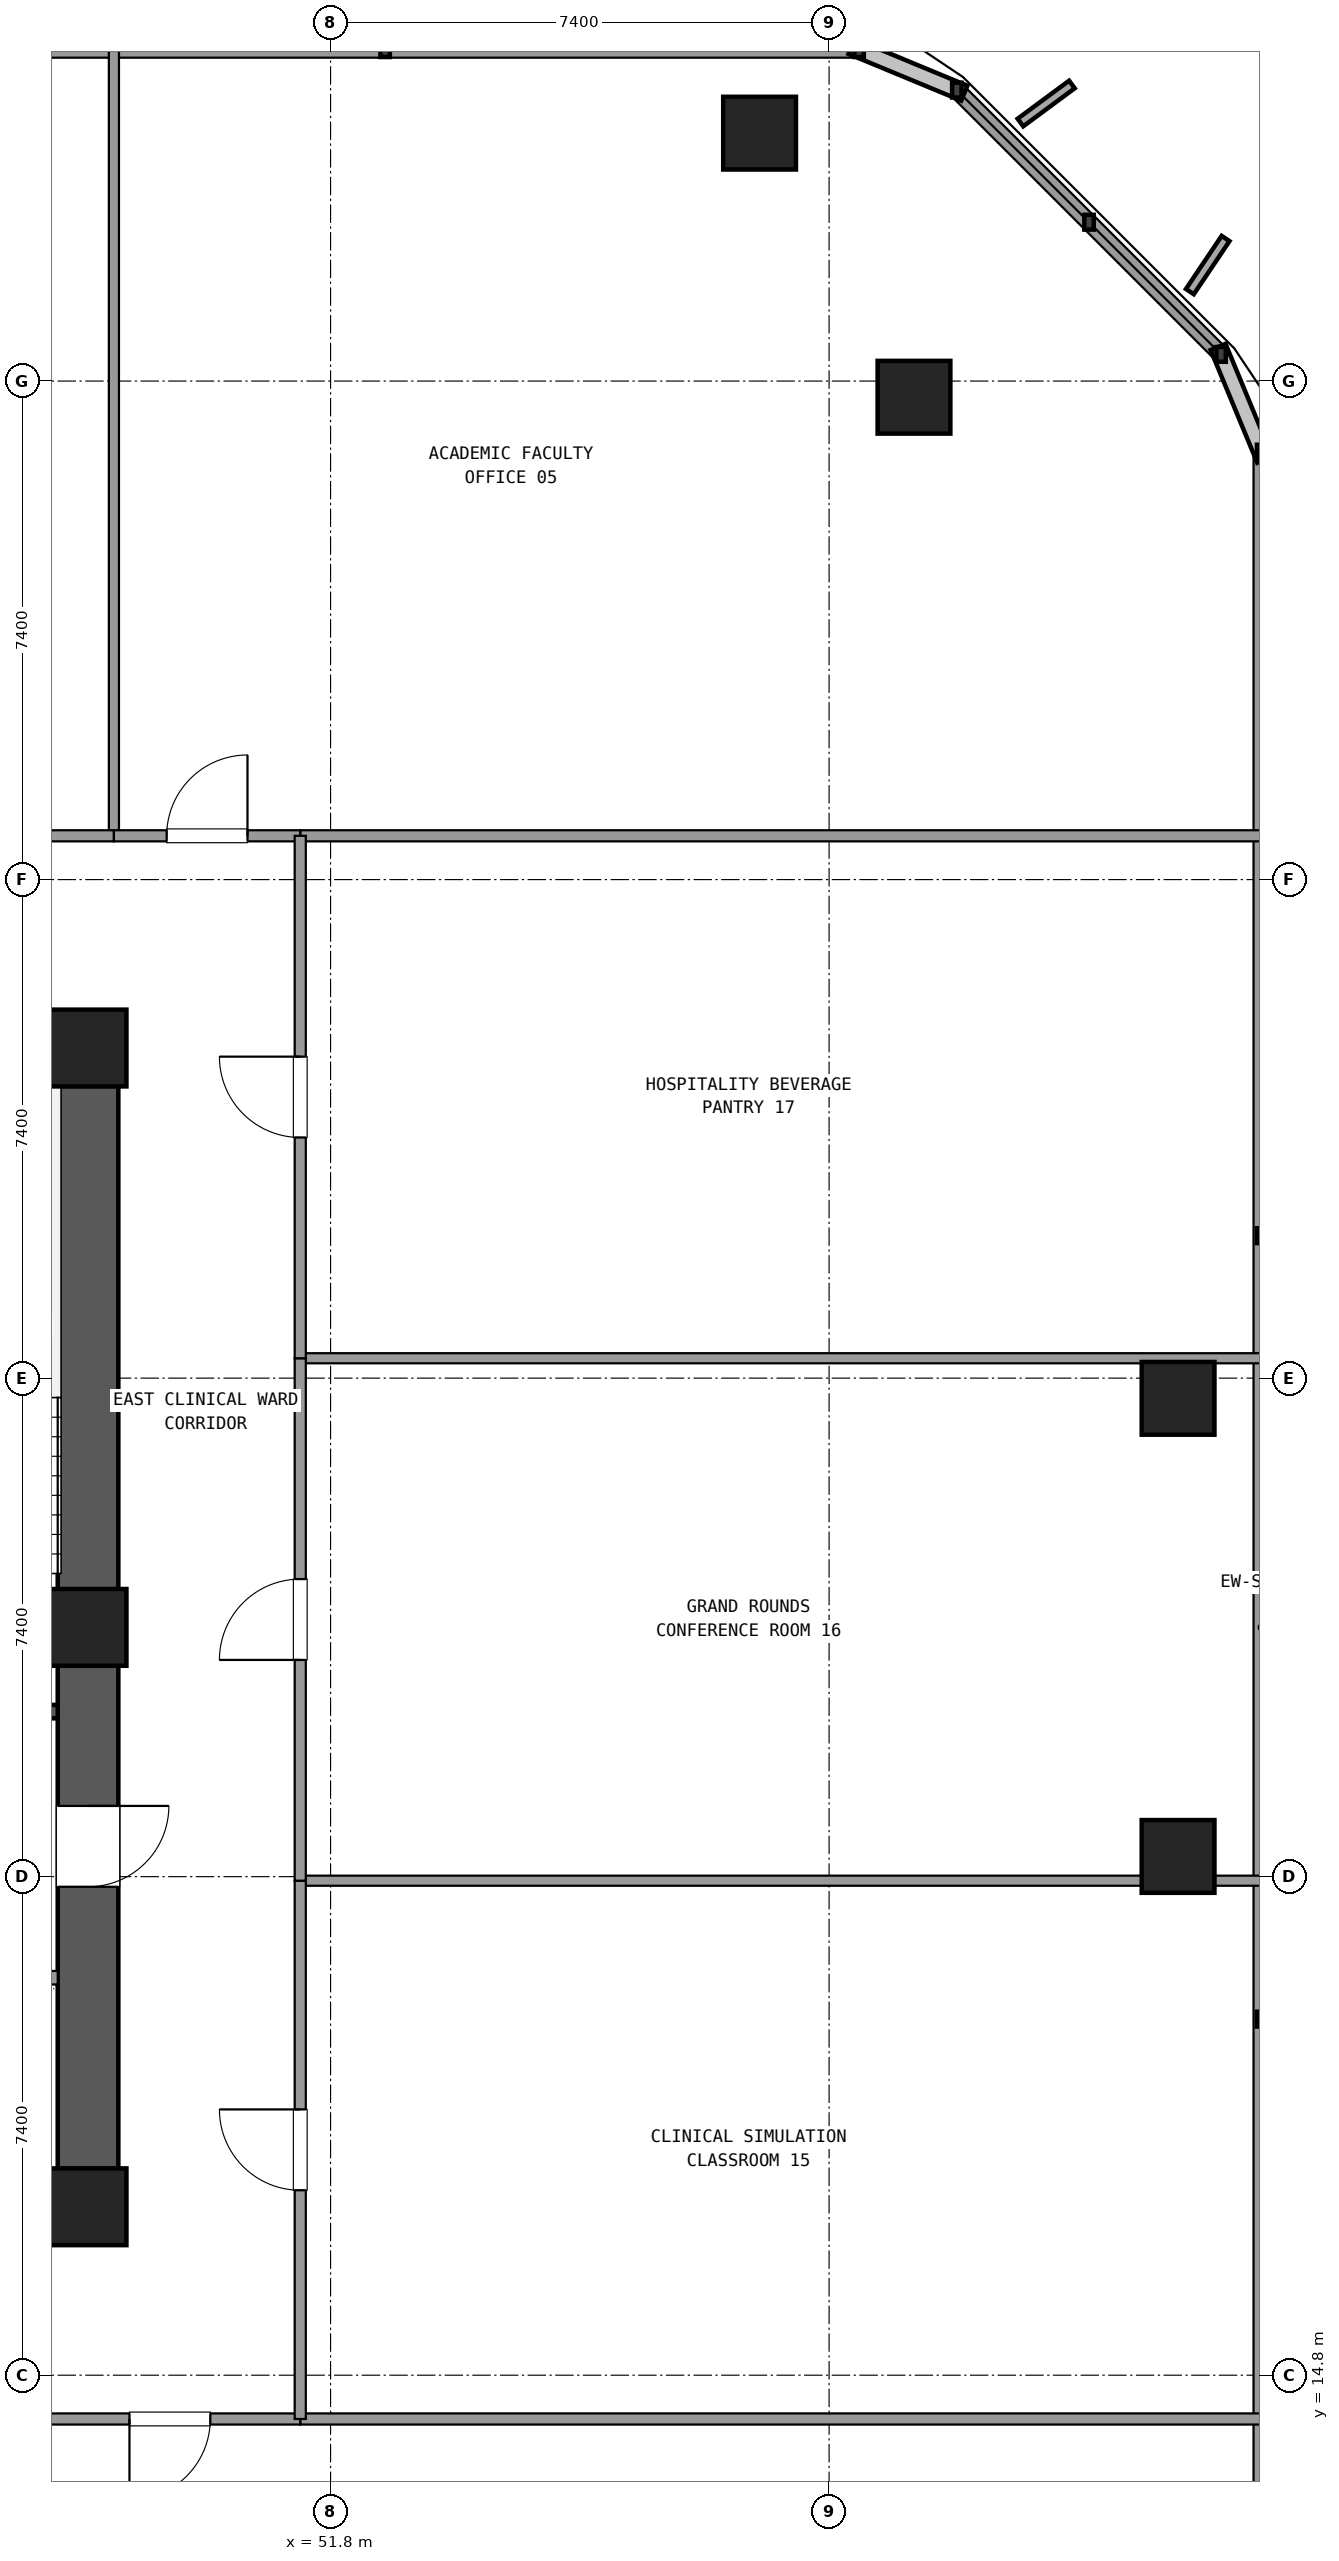
"""IFC4 building model, lengths in metres.
Left out: names, types, materials, properties, quantities, classifications, styles, units other than length and angle.
Written with IfcOpenShell. Run it as: python <this file> out.ifc"""

import sys

from ifc_helpers import new_model, si_unit, direction, frame, frame_2d, origin, origin_2d, place, context, subcontext, project, spatial, rectangle, extrude, element, fill, save


model = new_model("IFC4")
c1 = context("Model", 3, precision=1e-05, world=origin(), true_north=direction((0.0, 1.0)))
c2 = subcontext(c1, "Body", "Model", "MODEL_VIEW")
j1 = project(units=[si_unit("LENGTHUNIT", "METRE"), si_unit("PLANEANGLEUNIT", "RADIAN")], contexts=[c1])
p1 = place(None, origin())
s1 = spatial("IfcSite", under=j1, at=p1, CompositionType="ELEMENT")
p2 = place(p1, origin())
s2 = spatial("IfcBuilding", under=s1, at=p2, CompositionType="ELEMENT")
p3 = place(p2, frame((0.0, 0.0, 52.74)))
s3 = spatial("IfcBuildingStorey", under=s2, at=p3, CompositionType="ELEMENT", Elevation=52.74)
for number, where, z_axis, x_axis in (
    (1, (48.2, 17.3, 0.0), (0.0, 0.0, 1.0), (1.0, 0.0, 0.0)),
    (2, (48.2, 25.9, 0.0), (0.0, 0.0, 1.0), (1.0, 0.0, 0.0)),
    (3, (48.2, 34.5, 0.0), (0.0, 0.0, 1.0), (1.0, 0.0, 0.0)),
):
    element("IfcColumn", number, at=place(p3, frame(where, z_axis=z_axis, x_axis=x_axis)), inside=s3, PredefinedType="COLUMN", context=c2, shape_type="SweptSolid", body=[
        extrude(rectangle(XDim=1.14, YDim=1.14, at=origin_2d()), origin(), (0.0, 0.0, 1.0), 3.6),
    ])
p4 = place(p3, frame((48.2, 17.865, 0.0), z_axis=(0.0, 0.0, 1.0), x_axis=(0.0, 1.0, 0.0)))
e4 = element("IfcWall", 4, at=p4, inside=s3, PredefinedType="SHEAR", context=c2, shape_type="SweptSolid", body=[
    extrude(rectangle(XDim=7.47, YDim=0.9, at=frame_2d((3.735, 0.0))), origin(), (0.0, 0.0, 1.0), 3.32),
])
p5 = place(p4, frame((4.185, 0.0, 0.0)))
e5 = element("IfcOpeningElement", 5, at=p5, cuts=e4, PredefinedType="OPENING", context=c2, shape_type="SweptSolid", body=[
    extrude(rectangle(XDim=1.2, YDim=2.15, at=frame_2d((0.6, 1.075))), frame((0.0, 0.46, 0.0), z_axis=(0.0, -1.0, 0.0), x_axis=(1.0, 0.0, 0.0)), (0.0, 0.0, 1.0), 0.92),
])
p6 = place(p3, frame((48.2, 26.465, 0.0), z_axis=(0.0, 0.0, 1.0), x_axis=(0.0, 1.0, 0.0)))
e6 = element("IfcWall", 6, at=p6, inside=s3, PredefinedType="SHEAR", context=c2, shape_type="SweptSolid", body=[
    extrude(rectangle(XDim=7.47, YDim=0.9, at=frame_2d((3.735, 0.0))), origin(), (0.0, 0.0, 1.0), 3.32),
])
for number, where, z_axis, x_axis in (
    (7, (64.38, 22.5, 0.0), (0.0, 0.0, 1.0), (1.0, 0.0, 0.0)),
    (8, (64.38, 29.3, 0.0), (0.0, 0.0, 1.0), (1.0, 0.0, 0.0)),
    (9, (60.46, 44.16, 0.0), (0.0, 0.0, 1.0), (1.0, 0.0, 0.0)),
    (10, (58.168, 48.08, 0.0), (0.0, 0.0, 1.0), (1.0, 0.0, 0.0)),
):
    element("IfcColumn", number, at=place(p3, frame(where, z_axis=z_axis, x_axis=x_axis)), inside=s3, PredefinedType="COLUMN", context=c2, shape_type="SweptSolid", body=[
        extrude(rectangle(XDim=1.08, YDim=1.08, at=origin_2d()), origin(), (0.0, 0.0, 1.0), 3.6),
    ])
p7 = place(p3, frame((65.62, 8.455, 0.0), z_axis=(0.0, 0.0, 1.0), x_axis=(0.0, 1.0, 0.0)))
e11 = element("IfcWall", 11, at=p7, inside=s3, PredefinedType="SOLIDWALL", context=c2, shape_type="SweptSolid", body=[
    extrude(rectangle(XDim=34.89, YDim=0.24, at=frame_2d((17.445, 0.0))), origin(), (0.0, 0.0, 1.0), 0.85),
])
p8 = place(p3, frame((65.019, 44.796, 0.0), z_axis=(0.0, 0.0, 1.0), x_axis=(-0.707106781187, 0.707106781187, 0.0)))
e12 = element("IfcWall", 12, at=p8, inside=s3, PredefinedType="SOLIDWALL", context=c2, shape_type="SweptSolid", body=[
    extrude(rectangle(XDim=5.548, YDim=0.24, at=frame_2d((2.774, 0.0))), origin(), (0.0, 0.0, 1.0), 0.85),
])
p9 = place(p3, frame((59.645, 49.32, 0.0), z_axis=(0.0, 0.0, 1.0), x_axis=(-1.0, 0.0, 0.0)))
e13 = element("IfcWall", 13, at=p9, inside=s3, PredefinedType="SOLIDWALL", context=c2, shape_type="SweptSolid", body=[
    extrude(rectangle(XDim=21.105, YDim=0.24, at=frame_2d((10.552, 0.0))), origin(), (0.0, 0.0, 1.0), 0.85),
])
p10 = place(p3, frame((43.35, 24.65, 0.0), z_axis=(0.0, 0.0, 1.0), x_axis=(1.0, 0.0, 0.0)))
e14 = element("IfcWall", 14, at=p10, inside=s3, PredefinedType="SHEAR", context=c2, shape_type="SweptSolid", body=[
    extrude(rectangle(XDim=4.4, YDim=0.2, at=frame_2d((2.2, 0.0))), origin(), (0.0, 0.0, 1.0), 3.32),
])
p11 = place(p10, frame((2.0, 0.0, 0.0)))
e15 = element("IfcOpeningElement", 15, at=p11, cuts=e14, PredefinedType="OPENING", context=c2, shape_type="SweptSolid", body=[
    extrude(rectangle(XDim=1.2, YDim=2.15, at=frame_2d((0.6, 1.075))), frame((0.0, 0.11, 0.0), z_axis=(0.0, -1.0, 0.0), x_axis=(1.0, 0.0, 0.0)), (0.0, 0.0, 1.0), 0.22),
])
p12 = place(p3, frame((43.35, 20.7, 0.0), z_axis=(0.0, 0.0, 1.0), x_axis=(1.0, 0.0, 0.0)))
e16 = element("IfcWall", 16, at=p12, inside=s3, PredefinedType="SOLIDWALL", context=c2, shape_type="SweptSolid", body=[
    extrude(rectangle(XDim=4.4, YDim=0.2, at=frame_2d((2.2, 0.0))), origin(), (0.0, 0.0, 1.0), 2.61),
])
p13 = place(p12, frame((2.35, 0.0, 0.0)))
e17 = element("IfcOpeningElement", 17, at=p13, cuts=e16, PredefinedType="OPENING", context=c2, shape_type="SweptSolid", body=[
    extrude(rectangle(XDim=1.2, YDim=2.15, at=frame_2d((0.6, 1.075))), frame((0.0, 0.11, 0.0), z_axis=(0.0, -1.0, 0.0), x_axis=(1.0, 0.0, 0.0)), (0.0, 0.0, 1.0), 0.22),
])
for number, where, z_axis, x_axis in (
    (18, (51.35, 37.65, 0.0), (0.0, 0.0, 1.0), (1.0, 0.0, 0.0)),
    (19, (51.35, 14.15, 0.0), (0.0, 0.0, 1.0), (1.0, 0.0, 0.0)),
):
    element("IfcWall", number, at=place(p3, frame(where, z_axis=z_axis, x_axis=x_axis)), inside=s3, PredefinedType="PARTITIONING", context=c2, shape_type="SweptSolid", body=[
        extrude(rectangle(XDim=14.25, YDim=0.165, at=frame_2d((7.125, 0.0))), origin(), (0.0, 0.0, 1.0), 2.61),
    ])
p14 = place(p3, frame((48.584, 37.65, 0.0), z_axis=(0.0, 0.0, 1.0), x_axis=(0.0, 1.0, 0.0)))
e20 = element("IfcWall", 20, at=p14, inside=s3, PredefinedType="PARTITIONING", context=c2, shape_type="SweptSolid", body=[
    extrude(rectangle(XDim=11.65, YDim=0.15, at=frame_2d((5.825, 0.0))), origin(), (0.0, 0.0, 1.0), 2.61),
])
p15 = place(p3, frame((38.8, 37.65, 0.0), z_axis=(0.0, 0.0, 1.0), x_axis=(1.0, 0.0, 0.0)))
e21 = element("IfcWall", 21, at=p15, inside=s3, PredefinedType="PARTITIONING", context=c2, shape_type="SweptSolid", body=[
    extrude(rectangle(XDim=9.784, YDim=0.165, at=frame_2d((4.892, 0.0))), origin(), (0.0, 0.0, 1.0), 2.61),
])
p16 = place(p15, frame((4.292, 0.0, 0.0)))
e22 = element("IfcOpeningElement", 22, at=p16, cuts=e21, PredefinedType="OPENING", context=c2, shape_type="SweptSolid", body=[
    extrude(rectangle(XDim=1.2, YDim=2.15, at=frame_2d((0.6, 1.075))), frame((0.0, 0.093, 0.0), z_axis=(0.0, -1.0, 0.0), x_axis=(1.0, 0.0, 0.0)), (0.0, 0.0, 1.0), 0.185),
])
p17 = place(p3, frame((48.584, 37.65, 0.0), z_axis=(0.0, 0.0, 1.0), x_axis=(1.0, 0.0, 0.0)))
e23 = element("IfcWall", 23, at=p17, inside=s3, PredefinedType="PARTITIONING", context=c2, shape_type="SweptSolid", body=[
    extrude(rectangle(XDim=2.766, YDim=0.165, at=frame_2d((1.383, 0.0))), origin(), (0.0, 0.0, 1.0), 2.61),
])
p18 = place(p17, frame((0.783, 0.0, 0.0)))
e24 = element("IfcOpeningElement", 24, at=p18, cuts=e23, PredefinedType="OPENING", context=c2, shape_type="SweptSolid", body=[
    extrude(rectangle(XDim=1.2, YDim=2.15, at=frame_2d((0.6, 1.075))), frame((0.0, 0.093, 0.0), z_axis=(0.0, -1.0, 0.0), x_axis=(1.0, 0.0, 0.0)), (0.0, 0.0, 1.0), 0.185),
])
p19 = place(p3, frame((47.48, 14.15, 0.0), z_axis=(0.0, 0.0, 1.0), x_axis=(1.0, 0.0, 0.0)))
e25 = element("IfcWall", 25, at=p19, inside=s3, PredefinedType="PARTITIONING", context=c2, shape_type="SweptSolid", body=[
    extrude(rectangle(XDim=3.87, YDim=0.165, at=frame_2d((1.935, 0.0))), origin(), (0.0, 0.0, 1.0), 2.61),
])
p20 = place(p19, frame((1.335, 0.0, 0.0)))
e26 = element("IfcOpeningElement", 26, at=p20, cuts=e25, PredefinedType="OPENING", context=c2, shape_type="SweptSolid", body=[
    extrude(rectangle(XDim=1.2, YDim=2.15, at=frame_2d((0.6, 1.075))), frame((0.0, 0.093, 0.0), z_axis=(0.0, -1.0, 0.0), x_axis=(1.0, 0.0, 0.0)), (0.0, 0.0, 1.0), 0.185),
])
p21 = place(p3, frame((51.35, 22.14, 0.0), z_axis=(0.0, 0.0, 1.0), x_axis=(1.0, 0.0, 0.0)))
e27 = element("IfcWall", 27, at=p21, inside=s3, PredefinedType="PARTITIONING", context=c2, shape_type="SweptSolid", body=[
    extrude(rectangle(XDim=14.25, YDim=0.15, at=frame_2d((7.125, 0.0))), origin(), (0.0, 0.0, 1.0), 2.61),
])
p22 = place(p3, frame((51.35, 14.15, 0.0), z_axis=(0.0, 0.0, 1.0), x_axis=(0.0, 1.0, 0.0)))
e28 = element("IfcWall", 28, at=p22, inside=s3, PredefinedType="PARTITIONING", context=c2, shape_type="SweptSolid", body=[
    extrude(rectangle(XDim=7.99, YDim=0.165, at=frame_2d((3.995, 0.0))), origin(), (0.0, 0.0, 1.0), 2.61),
])
p23 = place(p22, frame((3.395, 0.0, 0.0)))
e29 = element("IfcOpeningElement", 29, at=p23, cuts=e28, PredefinedType="OPENING", context=c2, shape_type="SweptSolid", body=[
    extrude(rectangle(XDim=1.2, YDim=2.15, at=frame_2d((0.6, 1.075))), frame((0.0, 0.093, 0.0), z_axis=(0.0, -1.0, 0.0), x_axis=(1.0, 0.0, 0.0)), (0.0, 0.0, 1.0), 0.185),
])
p24 = place(p3, frame((51.35, 29.895, 0.0), z_axis=(0.0, 0.0, 1.0), x_axis=(1.0, 0.0, 0.0)))
e30 = element("IfcWall", 30, at=p24, inside=s3, PredefinedType="PARTITIONING", context=c2, shape_type="SweptSolid", body=[
    extrude(rectangle(XDim=14.25, YDim=0.15, at=frame_2d((7.125, 0.0))), origin(), (0.0, 0.0, 1.0), 2.61),
])
p25 = place(p3, frame((51.35, 22.14, 0.0), z_axis=(0.0, 0.0, 1.0), x_axis=(0.0, 1.0, 0.0)))
e31 = element("IfcWall", 31, at=p25, inside=s3, PredefinedType="PARTITIONING", context=c2, shape_type="SweptSolid", body=[
    extrude(rectangle(XDim=7.755, YDim=0.165, at=frame_2d((3.877, 0.0))), origin(), (0.0, 0.0, 1.0), 2.61),
])
p26 = place(p25, frame((3.277, 0.0, 0.0)))
e32 = element("IfcOpeningElement", 32, at=p26, cuts=e31, PredefinedType="OPENING", context=c2, shape_type="SweptSolid", body=[
    extrude(rectangle(XDim=1.2, YDim=2.15, at=frame_2d((0.6, 1.075))), frame((0.0, 0.093, 0.0), z_axis=(0.0, -1.0, 0.0), x_axis=(1.0, 0.0, 0.0)), (0.0, 0.0, 1.0), 0.185),
])
p27 = place(p3, frame((51.35, 29.895, 0.0), z_axis=(0.0, 0.0, 1.0), x_axis=(0.0, 1.0, 0.0)))
e33 = element("IfcWall", 33, at=p27, inside=s3, PredefinedType="PARTITIONING", context=c2, shape_type="SweptSolid", body=[
    extrude(rectangle(XDim=7.755, YDim=0.165, at=frame_2d((3.877, 0.0))), origin(), (0.0, 0.0, 1.0), 2.61),
])
p28 = place(p27, frame((3.277, 0.0, 0.0)))
e34 = element("IfcOpeningElement", 34, at=p28, cuts=e33, PredefinedType="OPENING", context=c2, shape_type="SweptSolid", body=[
    extrude(rectangle(XDim=1.2, YDim=2.15, at=frame_2d((0.6, 1.075))), frame((0.0, 0.093, 0.0), z_axis=(0.0, -1.0, 0.0), x_axis=(1.0, 0.0, 0.0)), (0.0, 0.0, 1.0), 0.185),
])
p29 = place(p5, frame((1.2, 0.0, 0.0), z_axis=(0.0, 0.0, 1.0), x_axis=(-1.0, 0.0, 0.0)))
e35 = element("IfcDoor", 35, at=p29, inside=s3, OperationType="SINGLE_SWING_RIGHT", PredefinedType="DOOR", context=c2, shape_type="SweptSolid", body=[
    extrude(rectangle(XDim=1.2, YDim=2.15, at=frame_2d((0.6, 1.075))), frame((0.0, 0.025, 0.0), z_axis=(0.0, -1.0, 0.0), x_axis=(1.0, 0.0, 0.0)), (0.0, 0.0, 1.0), 0.05),
])
fill(e5, e35)
p30 = place(p18, origin())
e36 = element("IfcDoor", 36, at=p30, inside=s3, OperationType="SINGLE_SWING_RIGHT", PredefinedType="DOOR", context=c2, shape_type="SweptSolid", body=[
    extrude(rectangle(XDim=1.2, YDim=2.15, at=frame_2d((0.6, 1.075))), frame((0.0, 0.025, 0.0), z_axis=(0.0, -1.0, 0.0), x_axis=(1.0, 0.0, 0.0)), (0.0, 0.0, 1.0), 0.05),
])
fill(e24, e36)
p31 = place(p20, frame((1.2, 0.0, 0.0), z_axis=(0.0, 0.0, 1.0), x_axis=(-1.0, 0.0, 0.0)))
e37 = element("IfcDoor", 37, at=p31, inside=s3, OperationType="SINGLE_SWING_LEFT", PredefinedType="DOOR", context=c2, shape_type="SweptSolid", body=[
    extrude(rectangle(XDim=1.2, YDim=2.15, at=frame_2d((0.6, 1.075))), frame((0.0, 0.025, 0.0), z_axis=(0.0, -1.0, 0.0), x_axis=(1.0, 0.0, 0.0)), (0.0, 0.0, 1.0), 0.05),
])
fill(e26, e37)
p32 = place(p23, origin())
e38 = element("IfcDoor", 38, at=p32, inside=s3, OperationType="SINGLE_SWING_RIGHT", PredefinedType="DOOR", context=c2, shape_type="SweptSolid", body=[
    extrude(rectangle(XDim=1.2, YDim=2.15, at=frame_2d((0.6, 1.075))), frame((0.0, 0.025, 0.0), z_axis=(0.0, -1.0, 0.0), x_axis=(1.0, 0.0, 0.0)), (0.0, 0.0, 1.0), 0.05),
])
fill(e29, e38)
p33 = place(p26, origin())
e39 = element("IfcDoor", 39, at=p33, inside=s3, OperationType="SINGLE_SWING_LEFT", PredefinedType="DOOR", context=c2, shape_type="SweptSolid", body=[
    extrude(rectangle(XDim=1.2, YDim=2.15, at=frame_2d((0.6, 1.075))), frame((0.0, 0.025, 0.0), z_axis=(0.0, -1.0, 0.0), x_axis=(1.0, 0.0, 0.0)), (0.0, 0.0, 1.0), 0.05),
])
fill(e32, e39)
p34 = place(p28, origin())
e40 = element("IfcDoor", 40, at=p34, inside=s3, OperationType="SINGLE_SWING_RIGHT", PredefinedType="DOOR", context=c2, shape_type="SweptSolid", body=[
    extrude(rectangle(XDim=1.2, YDim=2.15, at=frame_2d((0.6, 1.075))), frame((0.0, 0.025, 0.0), z_axis=(0.0, -1.0, 0.0), x_axis=(1.0, 0.0, 0.0)), (0.0, 0.0, 1.0), 0.05),
])
fill(e34, e40)
save(model, sys.argv[1])
